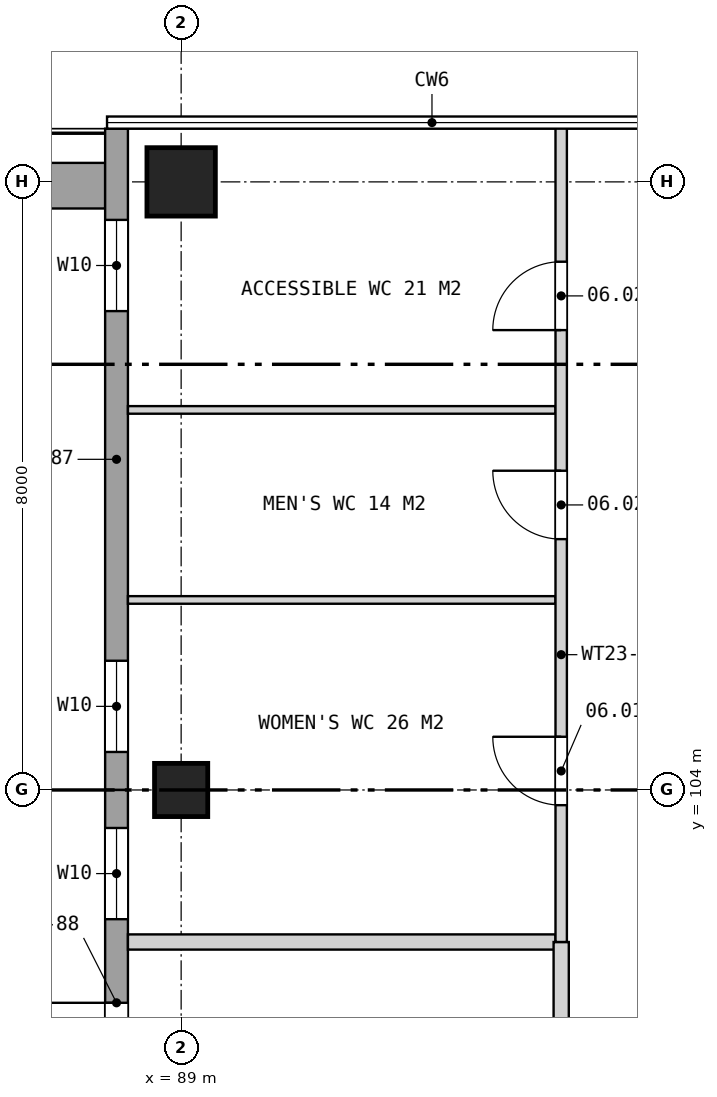
"""IFC4 building model, lengths in metres.
Left out: names, types, materials, properties, quantities, classifications, styles, units other than length and angle.
Written with IfcOpenShell. Run it as: python <this file> out.ifc"""

import sys

from ifc_helpers import new_model, si_unit, direction, frame, frame_2d, origin, origin_2d, place, context, subcontext, project, spatial, rectangle, extrude, element, fill, save


model = new_model("IFC4")
c1 = context("Model", 3, precision=1e-05, world=origin(), true_north=direction((0.0, 1.0)))
c2 = subcontext(c1, "Body", "Model", "MODEL_VIEW")
j1 = project(units=[si_unit("LENGTHUNIT", "METRE"), si_unit("PLANEANGLEUNIT", "RADIAN")], contexts=[c1])
p1 = place(None, origin())
s1 = spatial("IfcSite", under=j1, at=p1, CompositionType="ELEMENT")
p2 = place(p1, origin())
s2 = spatial("IfcBuilding", under=s1, at=p2, CompositionType="ELEMENT")
p3 = place(p2, frame((0.0, 0.0, 47.5)))
s3 = spatial("IfcBuildingStorey", under=s2, at=p3, CompositionType="ELEMENT", Elevation=47.5)
p4 = place(p3, frame((89.0, 112.0, 0.0), z_axis=(0.0, 0.0, 1.0), x_axis=(1.0, 0.0, 0.0)))
e1 = element("IfcColumn", 1, at=p4, inside=s3, PredefinedType="COLUMN", context=c2, shape_type="SweptSolid", body=[
    extrude(rectangle(XDim=0.9, YDim=0.9, at=origin_2d()), origin(), (0.0, 0.0, 1.0), 6.0),
])
p5 = place(p3, frame((89.0, 104.0, 5.2), z_axis=(0.0, 0.0, 1.0), x_axis=(1.0, 0.0, 0.0)))
e2 = element("IfcColumn", 2, at=p5, inside=s3, PredefinedType="COLUMN", context=c2, shape_type="SweptSolid", body=[
    extrude(rectangle(XDim=0.7, YDim=0.7, at=origin_2d()), origin(), (0.0, 0.0, 1.0), 0.8),
])
p6 = place(p3, frame((81.35, 111.95, 0.0), z_axis=(0.0, 0.0, 1.0), x_axis=(1.0, 0.0, 0.0)))
e3 = element("IfcWall", 3, at=p6, inside=s3, PredefinedType="SOLIDWALL", context=c2, shape_type="SweptSolid", body=[
    extrude(rectangle(XDim=6.65, YDim=0.6, at=frame_2d((3.325, 0.0))), origin(), (0.0, 0.0, 1.0), 0.6),
])
p7 = place(p3, frame((88.15, 112.7, 0.0), z_axis=(0.0, 0.0, 1.0), x_axis=(0.0, -1.0, 0.0)))
e4 = element("IfcWall", 4, at=p7, inside=s3, PredefinedType="SOLIDWALL", context=c2, shape_type="SweptSolid", body=[
    extrude(rectangle(XDim=8.7, YDim=0.3, at=frame_2d((4.35, 0.0))), origin(), (0.0, 0.0, 1.0), 5.256),
])
p8 = place(p7, frame((1.2, 0.0, 0.4)))
e5 = element("IfcOpeningElement", 5, at=p8, cuts=e4, PredefinedType="OPENING", context=c2, shape_type="SweptSolid", body=[
    extrude(rectangle(XDim=1.2, YDim=2.2, at=frame_2d((0.6, 1.1))), frame((0.0, 0.16, 0.0), z_axis=(0.0, -1.0, 0.0), x_axis=(1.0, 0.0, 0.0)), (0.0, 0.0, 1.0), 0.32),
])
p9 = place(p7, frame((7.0, 0.0, 0.4)))
e6 = element("IfcOpeningElement", 6, at=p9, cuts=e4, PredefinedType="OPENING", context=c2, shape_type="SweptSolid", body=[
    extrude(rectangle(XDim=1.2, YDim=2.2, at=frame_2d((0.6, 1.1))), frame((0.0, 0.16, 0.0), z_axis=(0.0, -1.0, 0.0), x_axis=(1.0, 0.0, 0.0)), (0.0, 0.0, 1.0), 0.32),
])
p10 = place(p3, frame((88.15, 104.0, 0.0), z_axis=(0.0, 0.0, 1.0), x_axis=(0.0, -1.0, 0.0)))
e7 = element("IfcWall", 7, at=p10, inside=s3, PredefinedType="SOLIDWALL", context=c2, shape_type="SweptSolid", body=[
    extrude(rectangle(XDim=8.0, YDim=0.3, at=frame_2d((4.0, 0.0))), origin(), (0.0, 0.0, 1.0), 5.256),
])
p11 = place(p10, frame((2.8, 0.0, 0.0)))
e8 = element("IfcOpeningElement", 8, at=p11, cuts=e7, PredefinedType="OPENING", context=c2, shape_type="SweptSolid", body=[
    extrude(rectangle(XDim=2.4, YDim=2.4, at=frame_2d((1.2, 1.2))), frame((0.0, 0.16, 0.0), z_axis=(0.0, -1.0, 0.0), x_axis=(1.0, 0.0, 0.0)), (0.0, 0.0, 1.0), 0.32),
])
p12 = place(p10, frame((0.5, 0.0, 0.4)))
e9 = element("IfcOpeningElement", 9, at=p12, cuts=e7, PredefinedType="OPENING", context=c2, shape_type="SweptSolid", body=[
    extrude(rectangle(XDim=1.2, YDim=2.2, at=frame_2d((0.6, 1.1))), frame((0.0, 0.16, 0.0), z_axis=(0.0, -1.0, 0.0), x_axis=(1.0, 0.0, 0.0)), (0.0, 0.0, 1.0), 0.32),
])
p13 = place(p10, frame((6.3, 0.0, 0.4)))
e10 = element("IfcOpeningElement", 10, at=p13, cuts=e7, PredefinedType="OPENING", context=c2, shape_type="SweptSolid", body=[
    extrude(rectangle(XDim=1.2, YDim=2.2, at=frame_2d((0.6, 1.1))), frame((0.0, 0.16, 0.0), z_axis=(0.0, -1.0, 0.0), x_axis=(1.0, 0.0, 0.0)), (0.0, 0.0, 1.0), 0.32),
])
p14 = place(p3, frame((88.3, 102.0, 0.0), z_axis=(0.0, 0.0, 1.0), x_axis=(1.0, 0.0, 0.0)))
e11 = element("IfcWall", 11, at=p14, inside=s3, PredefinedType="PARTITIONING", context=c2, shape_type="SweptSolid", body=[
    extrude(rectangle(XDim=5.625, YDim=0.2, at=frame_2d((2.812, 0.0))), origin(), (0.0, 0.0, 1.0), 2.7),
])
for number, where, z_axis, x_axis in (
    (12, (88.3, 106.5, 0.0), (0.0, 0.0, 1.0), (1.0, 0.0, 0.0)),
    (13, (88.3, 109.0, 0.0), (0.0, 0.0, 1.0), (1.0, 0.0, 0.0)),
):
    element("IfcWall", number, at=place(p3, frame(where, z_axis=z_axis, x_axis=x_axis)), inside=s3, PredefinedType="PARTITIONING", context=c2, shape_type="SweptSolid", body=[
        extrude(rectangle(XDim=5.625, YDim=0.1, at=frame_2d((2.812, 0.0))), origin(), (0.0, 0.0, 1.0), 2.7),
    ])
p15 = place(p3, frame((94.0, 87.2, 0.0), z_axis=(0.0, 0.0, 1.0), x_axis=(0.0, 1.0, 0.0)))
e14 = element("IfcWall", 14, at=p15, inside=s3, PredefinedType="PARTITIONING", context=c2, shape_type="SweptSolid", body=[
    extrude(rectangle(XDim=14.8, YDim=0.2, at=frame_2d((7.4, 0.0))), origin(), (0.0, 0.0, 1.0), 5.256),
])
p16 = place(p15, frame((7.3, 0.0, 0.0)))
e15 = element("IfcOpeningElement", 15, at=p16, cuts=e14, PredefinedType="OPENING", context=c2, shape_type="SweptSolid", body=[
    extrude(rectangle(XDim=1.0, YDim=2.1, at=frame_2d((0.5, 1.05))), frame((0.0, 0.11, 0.0), z_axis=(0.0, -1.0, 0.0), x_axis=(1.0, 0.0, 0.0)), (0.0, 0.0, 1.0), 0.22),
])
p17 = place(p3, frame((94.0, 102.0, 0.0), z_axis=(0.0, 0.0, 1.0), x_axis=(0.0, 1.0, 0.0)))
e16 = element("IfcWall", 16, at=p17, inside=s3, PredefinedType="PARTITIONING", context=c2, shape_type="SweptSolid", body=[
    extrude(rectangle(XDim=10.8, YDim=0.15, at=frame_2d((5.4, 0.0))), origin(), (0.0, 0.0, 1.0), 5.256),
])
p18 = place(p17, frame((1.8, 0.0, 0.0)))
e17 = element("IfcOpeningElement", 17, at=p18, cuts=e16, PredefinedType="OPENING", context=c2, shape_type="SweptSolid", body=[
    extrude(rectangle(XDim=0.9, YDim=2.1, at=frame_2d((0.45, 1.05))), frame((0.0, 0.085, 0.0), z_axis=(0.0, -1.0, 0.0), x_axis=(1.0, 0.0, 0.0)), (0.0, 0.0, 1.0), 0.17),
])
p19 = place(p17, frame((5.3, 0.0, 0.0)))
e18 = element("IfcOpeningElement", 18, at=p19, cuts=e16, PredefinedType="OPENING", context=c2, shape_type="SweptSolid", body=[
    extrude(rectangle(XDim=0.9, YDim=2.1, at=frame_2d((0.45, 1.05))), frame((0.0, 0.085, 0.0), z_axis=(0.0, -1.0, 0.0), x_axis=(1.0, 0.0, 0.0)), (0.0, 0.0, 1.0), 0.17),
])
p20 = place(p17, frame((8.05, 0.0, 0.0)))
e19 = element("IfcOpeningElement", 19, at=p20, cuts=e16, PredefinedType="OPENING", context=c2, shape_type="SweptSolid", body=[
    extrude(rectangle(XDim=0.9, YDim=2.1, at=frame_2d((0.45, 1.05))), frame((0.0, 0.085, 0.0), z_axis=(0.0, -1.0, 0.0), x_axis=(1.0, 0.0, 0.0)), (0.0, 0.0, 1.0), 0.17),
])
p21 = place(p8, origin())
e20 = element("IfcWindow", 20, at=p21, inside=s3, PartitioningType="SINGLE_PANEL", PredefinedType="WINDOW", context=c2, shape_type="SweptSolid", body=[
    extrude(rectangle(XDim=1.2, YDim=2.2, at=frame_2d((0.6, 1.1))), frame((0.0, 0.03, 0.0), z_axis=(0.0, -1.0, 0.0), x_axis=(1.0, 0.0, 0.0)), (0.0, 0.0, 1.0), 0.06),
])
fill(e5, e20)
p22 = place(p9, origin())
e21 = element("IfcWindow", 21, at=p22, inside=s3, PartitioningType="SINGLE_PANEL", PredefinedType="WINDOW", context=c2, shape_type="SweptSolid", body=[
    extrude(rectangle(XDim=1.2, YDim=2.2, at=frame_2d((0.6, 1.1))), frame((0.0, 0.03, 0.0), z_axis=(0.0, -1.0, 0.0), x_axis=(1.0, 0.0, 0.0)), (0.0, 0.0, 1.0), 0.06),
])
fill(e6, e21)
p23 = place(p11, frame((2.4, 0.0, 0.0), z_axis=(0.0, 0.0, 1.0), x_axis=(-1.0, 0.0, 0.0)))
e22 = element("IfcDoor", 22, at=p23, inside=s3, OperationType="DOUBLE_DOOR_SINGLE_SWING", PredefinedType="DOOR", context=c2, shape_type="SweptSolid", body=[
    extrude(rectangle(XDim=2.4, YDim=2.4, at=frame_2d((1.2, 1.2))), frame((0.0, 0.025, 0.0), z_axis=(0.0, -1.0, 0.0), x_axis=(1.0, 0.0, 0.0)), (0.0, 0.0, 1.0), 0.05),
])
fill(e8, e22)
p24 = place(p12, origin())
e23 = element("IfcWindow", 23, at=p24, inside=s3, PartitioningType="SINGLE_PANEL", PredefinedType="WINDOW", context=c2, shape_type="SweptSolid", body=[
    extrude(rectangle(XDim=1.2, YDim=2.2, at=frame_2d((0.6, 1.1))), frame((0.0, 0.03, 0.0), z_axis=(0.0, -1.0, 0.0), x_axis=(1.0, 0.0, 0.0)), (0.0, 0.0, 1.0), 0.06),
])
fill(e9, e23)
p25 = place(p18, origin())
e24 = element("IfcDoor", 24, at=p25, inside=s3, OperationType="SINGLE_SWING_RIGHT", PredefinedType="DOOR", context=c2, shape_type="SweptSolid", body=[
    extrude(rectangle(XDim=0.9, YDim=2.1, at=frame_2d((0.45, 1.05))), frame((0.0, 0.025, 0.0), z_axis=(0.0, -1.0, 0.0), x_axis=(1.0, 0.0, 0.0)), (0.0, 0.0, 1.0), 0.05),
])
fill(e17, e24)
p26 = place(p19, origin())
e25 = element("IfcDoor", 25, at=p26, inside=s3, OperationType="SINGLE_SWING_RIGHT", PredefinedType="DOOR", context=c2, shape_type="SweptSolid", body=[
    extrude(rectangle(XDim=0.9, YDim=2.1, at=frame_2d((0.45, 1.05))), frame((0.0, 0.025, 0.0), z_axis=(0.0, -1.0, 0.0), x_axis=(1.0, 0.0, 0.0)), (0.0, 0.0, 1.0), 0.05),
])
fill(e18, e25)
p27 = place(p20, origin())
e26 = element("IfcDoor", 26, at=p27, inside=s3, OperationType="SINGLE_SWING_LEFT", PredefinedType="DOOR", context=c2, shape_type="SweptSolid", body=[
    extrude(rectangle(XDim=0.9, YDim=2.1, at=frame_2d((0.45, 1.05))), frame((0.0, 0.025, 0.0), z_axis=(0.0, -1.0, 0.0), x_axis=(1.0, 0.0, 0.0)), (0.0, 0.0, 1.0), 0.05),
])
fill(e19, e26)
save(model, sys.argv[1])
